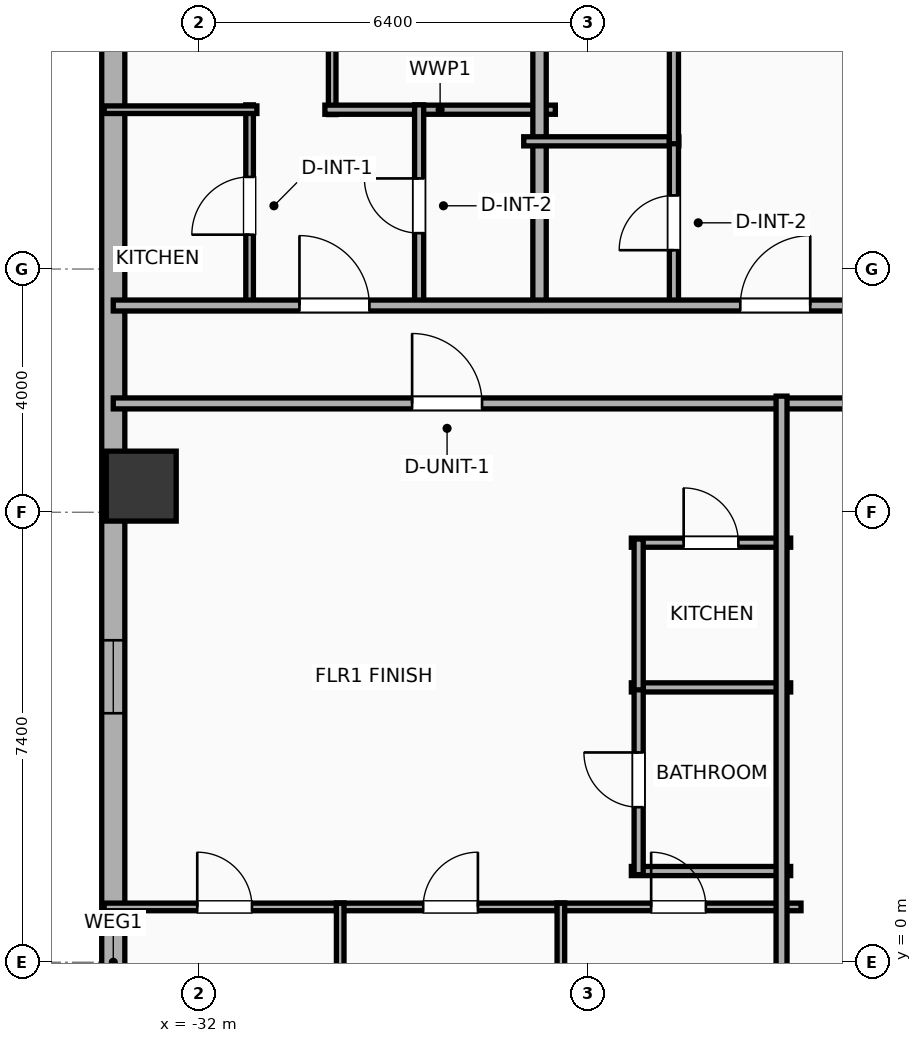
"""IFC4 building model, lengths in metres.
Left out: names, types, materials, properties, quantities, classifications, styles, units other than length and angle.
Written with IfcOpenShell. Run it as: python <this file> out.ifc"""

import sys

from ifc_helpers import new_model, si_unit, direction, frame, frame_2d, origin, origin_2d, place, context, subcontext, project, spatial, rectangle, hollow_rectangle, extrude, element, fill, save


model = new_model("IFC4")
c1 = context("Model", 3, precision=1e-05, world=origin(), true_north=direction((0.0, 1.0)))
c2 = subcontext(c1, "Body", "Model", "MODEL_VIEW")
j1 = project(units=[si_unit("LENGTHUNIT", "METRE"), si_unit("PLANEANGLEUNIT", "RADIAN")], contexts=[c1])
p1 = place(None, origin())
s1 = spatial("IfcSite", under=j1, at=p1, CompositionType="ELEMENT")
p2 = place(p1, origin())
s2 = spatial("IfcBuilding", under=s1, at=p2, CompositionType="ELEMENT")
p3 = place(p2, frame((0.0, 0.0, 29.9)))
s3 = spatial("IfcBuildingStorey", under=s2, at=p3, CompositionType="ELEMENT", Elevation=29.9)
p4 = place(p3, frame((-32.95, 7.83, 0.0), z_axis=(0.0, 0.0, 1.0), x_axis=(1.0, 0.0, 0.0)))
e1 = element("IfcColumn", 1, at=p4, inside=s3, PredefinedType="COLUMN", context=c2, shape_type="SweptSolid", body=[
    extrude(hollow_rectangle(XDim=1.15, YDim=1.15, WallThickness=0.04, at=origin_2d()), origin(), (0.0, 0.0, 1.0), 3.9),
])
p5 = place(p3, frame((-33.41, -18.381, 0.0), z_axis=(0.0, 0.0, 1.0), x_axis=(0.0, 1.0, 0.0)))
e2 = element("IfcWall", 2, at=p5, inside=s3, PredefinedType="ELEMENTEDWALL", context=c2, shape_type="SweptSolid", body=[
    extrude(rectangle(XDim=36.763, YDim=0.38, at=frame_2d((18.381, 0.0))), origin(), (0.0, 0.0, 1.0), 2.54),
])
p6 = place(p5, frame((33.537, 0.0, 0.75)))
e3 = element("IfcOpeningElement", 3, at=p6, cuts=e2, PredefinedType="OPENING", context=c2, shape_type="SweptSolid", body=[
    extrude(rectangle(XDim=1.2, YDim=1.63, at=frame_2d((0.6, 0.815))), frame((0.0, 0.2, 0.0), z_axis=(0.0, -1.0, 0.0), x_axis=(1.0, 0.0, 0.0)), (0.0, 0.0, 1.0), 0.4),
])
p7 = place(p5, frame((22.476, 0.0, 0.75)))
e4 = element("IfcOpeningElement", 4, at=p7, cuts=e2, PredefinedType="OPENING", context=c2, shape_type="SweptSolid", body=[
    extrude(rectangle(XDim=1.2, YDim=1.63, at=frame_2d((0.6, 0.815))), frame((0.0, 0.2, 0.0), z_axis=(0.0, -1.0, 0.0), x_axis=(1.0, 0.0, 0.0)), (0.0, 0.0, 1.0), 0.4),
])
p8 = place(p5, frame((13.226, 0.0, 0.75)))
e5 = element("IfcOpeningElement", 5, at=p8, cuts=e2, PredefinedType="OPENING", context=c2, shape_type="SweptSolid", body=[
    extrude(rectangle(XDim=1.2, YDim=1.63, at=frame_2d((0.6, 0.815))), frame((0.0, 0.2, 0.0), z_axis=(0.0, -1.0, 0.0), x_axis=(1.0, 0.0, 0.0)), (0.0, 0.0, 1.0), 0.4),
])
p9 = place(p3, frame((-33.41, 9.19, 0.0), z_axis=(0.0, 0.0, 1.0), x_axis=(1.0, 0.0, 0.0)))
e6 = element("IfcWall", 6, at=p9, inside=s3, PredefinedType="PARTITIONING", context=c2, shape_type="SweptSolid", body=[
    extrude(rectangle(XDim=23.53, YDim=0.18, at=frame_2d((11.765, 0.0))), origin(), (0.0, 0.0, 1.0), 3.65),
])
p10 = place(p9, frame((4.915, 0.0, 0.0)))
e7 = element("IfcOpeningElement", 7, at=p10, cuts=e6, PredefinedType="OPENING", context=c2, shape_type="SweptSolid", body=[
    extrude(rectangle(XDim=1.15, YDim=2.05, at=frame_2d((0.575, 1.025))), frame((0.0, 0.1, 0.0), z_axis=(0.0, -1.0, 0.0), x_axis=(1.0, 0.0, 0.0)), (0.0, 0.0, 1.0), 0.2),
])
p11 = place(p3, frame((-29.81, 13.94, 0.0), z_axis=(0.0, 0.0, 1.0), x_axis=(0.0, 1.0, 0.0)))
e8 = element("IfcWall", 8, at=p11, inside=s3, PredefinedType="PARTITIONING", context=c2, shape_type="SweptSolid", body=[
    extrude(rectangle(XDim=8.377, YDim=0.125, at=frame_2d((4.189, 0.0))), origin(), (0.0, 0.0, 1.0), 3.65),
])
p12 = place(p11, frame((1.561, 0.0, 0.0)))
e9 = element("IfcOpeningElement", 9, at=p12, cuts=e8, PredefinedType="OPENING", context=c2, shape_type="SweptSolid", body=[
    extrude(rectangle(XDim=0.9, YDim=2.05, at=frame_2d((0.45, 1.025))), frame((0.0, 0.073, 0.0), z_axis=(0.0, -1.0, 0.0), x_axis=(1.0, 0.0, 0.0)), (0.0, 0.0, 1.0), 0.145),
])
p13 = place(p3, frame((-29.93, 14.02, 0.0), z_axis=(0.0, 0.0, 1.0), x_axis=(1.0, 0.0, 0.0)))
e10 = element("IfcWall", 10, at=p13, inside=s3, PredefinedType="PLUMBINGWALL", context=c2, shape_type="SweptSolid", body=[
    extrude(rectangle(XDim=3.79, YDim=0.15, at=frame_2d((1.895, 0.0))), origin(), (0.0, 0.0, 1.0), 3.65),
])
p14 = place(p3, frame((-31.168, 10.78, 0.0), z_axis=(0.0, 0.0, 1.0), x_axis=(0.0, 1.0, 0.0)))
e11 = element("IfcWall", 11, at=p14, inside=s3, PredefinedType="PARTITIONING", context=c2, shape_type="SweptSolid", body=[
    extrude(rectangle(XDim=3.32, YDim=0.125, at=frame_2d((1.66, 0.0))), origin(), (0.0, 0.0, 1.0), 3.65),
])
p15 = place(p14, frame((1.185, 0.0, 0.0)))
e12 = element("IfcOpeningElement", 12, at=p15, cuts=e11, PredefinedType="OPENING", context=c2, shape_type="SweptSolid", body=[
    extrude(rectangle(XDim=0.95, YDim=2.05, at=frame_2d((0.475, 1.025))), frame((0.0, 0.073, 0.0), z_axis=(0.0, -1.0, 0.0), x_axis=(1.0, 0.0, 0.0)), (0.0, 0.0, 1.0), 0.145),
])
p16 = place(p3, frame((-33.56, 14.02, 0.0), z_axis=(0.0, 0.0, 1.0), x_axis=(1.0, 0.0, 0.0)))
e13 = element("IfcWall", 13, at=p16, inside=s3, PredefinedType="PARTITIONING", context=c2, shape_type="SweptSolid", body=[
    extrude(rectangle(XDim=2.512, YDim=0.125, at=frame_2d((1.256, 0.0))), origin(), (0.0, 0.0, 1.0), 3.65),
])
p17 = place(p3, frame((-28.38, 10.78, 0.0), z_axis=(0.0, 0.0, 1.0), x_axis=(0.0, 1.0, 0.0)))
e14 = element("IfcWall", 14, at=p17, inside=s3, PredefinedType="PLUMBINGWALL", context=c2, shape_type="SweptSolid", body=[
    extrude(rectangle(XDim=3.32, YDim=0.15, at=frame_2d((1.66, 0.0))), origin(), (0.0, 0.0, 1.0), 3.65),
])
p18 = place(p17, frame((1.21, 0.0, 0.0)))
e15 = element("IfcOpeningElement", 15, at=p18, cuts=e14, PredefinedType="OPENING", context=c2, shape_type="SweptSolid", body=[
    extrude(rectangle(XDim=0.9, YDim=2.05, at=frame_2d((0.45, 1.025))), frame((0.0, 0.085, 0.0), z_axis=(0.0, -1.0, 0.0), x_axis=(1.0, 0.0, 0.0)), (0.0, 0.0, 1.0), 0.17),
])
p19 = place(p3, frame((-26.4, 10.72, 0.0), z_axis=(0.0, 0.0, 1.0), x_axis=(0.0, 1.0, 0.0)))
e16 = element("IfcWall", 16, at=p19, inside=s3, PredefinedType="PARTITIONING", context=c2, shape_type="SweptSolid", body=[
    extrude(rectangle(XDim=11.49, YDim=0.22, at=frame_2d((5.745, 0.0))), origin(), (0.0, 0.0, 1.0), 3.65),
])
p20 = place(p3, frame((-26.66, 13.5, 0.0), z_axis=(0.0, 0.0, 1.0), x_axis=(1.0, 0.0, 0.0)))
e17 = element("IfcWall", 17, at=p20, inside=s3, PredefinedType="PLUMBINGWALL", context=c2, shape_type="SweptSolid", body=[
    extrude(rectangle(XDim=2.55, YDim=0.15, at=frame_2d((1.275, 0.0))), origin(), (0.0, 0.0, 1.0), 3.65),
])
p21 = place(p3, frame((-24.19, 10.78, 0.0), z_axis=(0.0, 0.0, 1.0), x_axis=(0.0, 1.0, 0.0)))
e18 = element("IfcWall", 18, at=p21, inside=s3, PredefinedType="PLUMBINGWALL", context=c2, shape_type="SweptSolid", body=[
    extrude(rectangle(XDim=2.76, YDim=0.15, at=frame_2d((1.38, 0.0))), origin(), (0.0, 0.0, 1.0), 3.65),
])
p22 = place(p21, frame((0.93, 0.0, 0.0)))
e19 = element("IfcOpeningElement", 19, at=p22, cuts=e18, PredefinedType="OPENING", context=c2, shape_type="SweptSolid", body=[
    extrude(rectangle(XDim=0.9, YDim=2.05, at=frame_2d((0.45, 1.025))), frame((0.0, 0.085, 0.0), z_axis=(0.0, -1.0, 0.0), x_axis=(1.0, 0.0, 0.0)), (0.0, 0.0, 1.0), 0.17),
])
p23 = place(p3, frame((-24.19, 13.46, 0.0), z_axis=(0.0, 0.0, 1.0), x_axis=(0.0, 1.0, 0.0)))
e20 = element("IfcWall", 20, at=p23, inside=s3, PredefinedType="PLUMBINGWALL", context=c2, shape_type="SweptSolid", body=[
    extrude(rectangle(XDim=8.798, YDim=0.15, at=frame_2d((4.399, 0.0))), origin(), (0.0, 0.0, 1.0), 3.65),
])
p24 = place(p23, frame((3.949, 0.0, 0.0)))
e21 = element("IfcOpeningElement", 21, at=p24, cuts=e20, PredefinedType="OPENING", context=c2, shape_type="SweptSolid", body=[
    extrude(rectangle(XDim=0.9, YDim=2.05, at=frame_2d((0.45, 1.025))), frame((0.0, 0.085, 0.0), z_axis=(0.0, -1.0, 0.0), x_axis=(1.0, 0.0, 0.0)), (0.0, 0.0, 1.0), 0.17),
])
p25 = place(p3, frame((-33.41, 10.8, 0.0), z_axis=(0.0, 0.0, 1.0), x_axis=(1.0, 0.0, 0.0)))
e22 = element("IfcWall", 22, at=p25, inside=s3, PredefinedType="PARTITIONING", context=c2, shape_type="SweptSolid", body=[
    extrude(rectangle(XDim=59.62, YDim=0.18, at=frame_2d((29.81, 0.0))), origin(), (0.0, 0.0, 1.0), 3.65),
])
p26 = place(p25, frame((3.062, 0.0, 0.0)))
e23 = element("IfcOpeningElement", 23, at=p26, cuts=e22, PredefinedType="OPENING", context=c2, shape_type="SweptSolid", body=[
    extrude(rectangle(XDim=1.15, YDim=2.05, at=frame_2d((0.575, 1.025))), frame((0.0, 0.1, 0.0), z_axis=(0.0, -1.0, 0.0), x_axis=(1.0, 0.0, 0.0)), (0.0, 0.0, 1.0), 0.2),
])
p27 = place(p25, frame((10.312, 0.0, 0.0)))
e24 = element("IfcOpeningElement", 24, at=p27, cuts=e22, PredefinedType="OPENING", context=c2, shape_type="SweptSolid", body=[
    extrude(rectangle(XDim=1.15, YDim=2.05, at=frame_2d((0.575, 1.025))), frame((0.0, 0.1, 0.0), z_axis=(0.0, -1.0, 0.0), x_axis=(1.0, 0.0, 0.0)), (0.0, 0.0, 1.0), 0.2),
])
p28 = place(p25, frame((15.153, 0.0, 0.0)))
e25 = element("IfcOpeningElement", 25, at=p28, cuts=e22, PredefinedType="OPENING", context=c2, shape_type="SweptSolid", body=[
    extrude(rectangle(XDim=0.9, YDim=2.05, at=frame_2d((0.45, 1.025))), frame((0.0, 0.1, 0.0), z_axis=(0.0, -1.0, 0.0), x_axis=(1.0, 0.0, 0.0)), (0.0, 0.0, 1.0), 0.2),
])
p29 = place(p25, frame((21.508, 0.0, 0.0)))
e26 = element("IfcOpeningElement", 26, at=p29, cuts=e22, PredefinedType="OPENING", context=c2, shape_type="SweptSolid", body=[
    extrude(rectangle(XDim=1.15, YDim=2.05, at=frame_2d((0.575, 1.025))), frame((0.0, 0.1, 0.0), z_axis=(0.0, -1.0, 0.0), x_axis=(1.0, 0.0, 0.0)), (0.0, 0.0, 1.0), 0.2),
])
p30 = place(p25, frame((26.355, 0.0, 0.0)))
e27 = element("IfcOpeningElement", 27, at=p30, cuts=e22, PredefinedType="OPENING", context=c2, shape_type="SweptSolid", body=[
    extrude(rectangle(XDim=0.9, YDim=2.05, at=frame_2d((0.45, 1.025))), frame((0.0, 0.1, 0.0), z_axis=(0.0, -1.0, 0.0), x_axis=(1.0, 0.0, 0.0)), (0.0, 0.0, 1.0), 0.2),
])
p31 = place(p25, frame((32.753, 0.0, 0.0)))
e28 = element("IfcOpeningElement", 28, at=p31, cuts=e22, PredefinedType="OPENING", context=c2, shape_type="SweptSolid", body=[
    extrude(rectangle(XDim=1.15, YDim=2.05, at=frame_2d((0.575, 1.025))), frame((0.0, 0.1, 0.0), z_axis=(0.0, -1.0, 0.0), x_axis=(1.0, 0.0, 0.0)), (0.0, 0.0, 1.0), 0.2),
])
p32 = place(p25, frame((36.163, 0.0, 0.0)))
e29 = element("IfcOpeningElement", 29, at=p32, cuts=e22, PredefinedType="OPENING", context=c2, shape_type="SweptSolid", body=[
    extrude(rectangle(XDim=1.15, YDim=2.05, at=frame_2d((0.575, 1.025))), frame((0.0, 0.1, 0.0), z_axis=(0.0, -1.0, 0.0), x_axis=(1.0, 0.0, 0.0)), (0.0, 0.0, 1.0), 0.2),
])
p33 = place(p25, frame((43.156, 0.0, 0.0)))
e30 = element("IfcOpeningElement", 30, at=p33, cuts=e22, PredefinedType="OPENING", context=c2, shape_type="SweptSolid", body=[
    extrude(rectangle(XDim=0.9, YDim=2.05, at=frame_2d((0.45, 1.025))), frame((0.0, 0.1, 0.0), z_axis=(0.0, -1.0, 0.0), x_axis=(1.0, 0.0, 0.0)), (0.0, 0.0, 1.0), 0.2),
])
p34 = place(p25, frame((47.36, 0.0, 0.0)))
e31 = element("IfcOpeningElement", 31, at=p34, cuts=e22, PredefinedType="OPENING", context=c2, shape_type="SweptSolid", body=[
    extrude(rectangle(XDim=1.15, YDim=2.05, at=frame_2d((0.575, 1.025))), frame((0.0, 0.1, 0.0), z_axis=(0.0, -1.0, 0.0), x_axis=(1.0, 0.0, 0.0)), (0.0, 0.0, 1.0), 0.2),
])
p35 = place(p25, frame((55.337, 0.0, 0.0)))
e32 = element("IfcOpeningElement", 32, at=p35, cuts=e22, PredefinedType="OPENING", context=c2, shape_type="SweptSolid", body=[
    extrude(rectangle(XDim=1.15, YDim=2.05, at=frame_2d((0.575, 1.025))), frame((0.0, 0.1, 0.0), z_axis=(0.0, -1.0, 0.0), x_axis=(1.0, 0.0, 0.0)), (0.0, 0.0, 1.0), 0.2),
])
p36 = place(p3, frame((-24.89, 6.9, 0.0), z_axis=(0.0, 0.0, 1.0), x_axis=(1.0, 0.0, 0.0)))
e33 = element("IfcWall", 33, at=p36, inside=s3, PredefinedType="PLUMBINGWALL", context=c2, shape_type="SweptSolid", body=[
    extrude(rectangle(XDim=2.62, YDim=0.15, at=frame_2d((1.31, 0.0))), origin(), (0.0, 0.0, 1.0), 2.54),
])
p37 = place(p36, frame((0.86, 0.0, 0.0)))
e34 = element("IfcOpeningElement", 34, at=p37, cuts=e33, PredefinedType="OPENING", context=c2, shape_type="SweptSolid", body=[
    extrude(rectangle(XDim=0.9, YDim=2.05, at=frame_2d((0.45, 1.025))), frame((0.0, 0.085, 0.0), z_axis=(0.0, -1.0, 0.0), x_axis=(1.0, 0.0, 0.0)), (0.0, 0.0, 1.0), 0.17),
])
for number, where, z_axis, x_axis in (
    (35, (-24.89, 4.52, 0.0), (0.0, 0.0, 1.0), (1.0, 0.0, 0.0)),
    (36, (-24.89, 1.5, 0.0), (0.0, 0.0, 1.0), (1.0, 0.0, 0.0)),
):
    element("IfcWall", number, at=place(p3, frame(where, z_axis=z_axis, x_axis=x_axis)), inside=s3, PredefinedType="PLUMBINGWALL", context=c2, shape_type="SweptSolid", body=[
        extrude(rectangle(XDim=2.62, YDim=0.15, at=frame_2d((1.31, 0.0))), origin(), (0.0, 0.0, 1.0), 3.65),
    ])
p38 = place(p3, frame((-24.77, 1.44, 0.0), z_axis=(0.0, 0.0, 1.0), x_axis=(0.0, 1.0, 0.0)))
e37 = element("IfcWall", 37, at=p38, inside=s3, PredefinedType="PLUMBINGWALL", context=c2, shape_type="SweptSolid", body=[
    extrude(rectangle(XDim=3.12, YDim=0.15, at=frame_2d((1.56, 0.0))), origin(), (0.0, 0.0, 1.0), 3.65),
])
p39 = place(p38, frame((1.11, 0.0, 0.0)))
e38 = element("IfcOpeningElement", 38, at=p39, cuts=e37, PredefinedType="OPENING", context=c2, shape_type="SweptSolid", body=[
    extrude(rectangle(XDim=0.9, YDim=2.05, at=frame_2d((0.45, 1.025))), frame((0.0, 0.085, 0.0), z_axis=(0.0, -1.0, 0.0), x_axis=(1.0, 0.0, 0.0)), (0.0, 0.0, 1.0), 0.17),
])
p40 = place(p3, frame((-24.77, 4.48, 0.0), z_axis=(0.0, 0.0, 1.0), x_axis=(0.0, 1.0, 0.0)))
e39 = element("IfcWall", 39, at=p40, inside=s3, PredefinedType="PLUMBINGWALL", context=c2, shape_type="SweptSolid", body=[
    extrude(rectangle(XDim=2.48, YDim=0.15, at=frame_2d((1.24, 0.0))), origin(), (0.0, 0.0, 1.0), 3.65),
])
p41 = place(p3, frame((-33.56, 0.91, 0.0), z_axis=(0.0, 0.0, 1.0), x_axis=(1.0, 0.0, 0.0)))
e40 = element("IfcWall", 40, at=p41, inside=s3, PredefinedType="PARTITIONING", context=c2, shape_type="SweptSolid", body=[
    extrude(rectangle(XDim=3.945, YDim=0.125, at=frame_2d((1.972, 0.0))), origin(), (0.0, 0.0, 1.0), 3.65),
])
p42 = place(p41, frame((1.531, 0.0, 0.0)))
e41 = element("IfcOpeningElement", 41, at=p42, cuts=e40, PredefinedType="OPENING", context=c2, shape_type="SweptSolid", body=[
    extrude(rectangle(XDim=0.9, YDim=2.05, at=frame_2d((0.45, 1.025))), frame((0.0, 0.073, 0.0), z_axis=(0.0, -1.0, 0.0), x_axis=(1.0, 0.0, 0.0)), (0.0, 0.0, 1.0), 0.145),
])
p43 = place(p3, frame((-29.74, 0.91, 0.0), z_axis=(0.0, 0.0, 1.0), x_axis=(1.0, 0.0, 0.0)))
e42 = element("IfcWall", 42, at=p43, inside=s3, PredefinedType="PARTITIONING", context=c2, shape_type="SweptSolid", body=[
    extrude(rectangle(XDim=3.754, YDim=0.125, at=frame_2d((1.877, 0.0))), origin(), (0.0, 0.0, 1.0), 3.65),
])
p44 = place(p43, frame((1.427, 0.0, 0.0)))
e43 = element("IfcOpeningElement", 43, at=p44, cuts=e42, PredefinedType="OPENING", context=c2, shape_type="SweptSolid", body=[
    extrude(rectangle(XDim=0.9, YDim=2.05, at=frame_2d((0.45, 1.025))), frame((0.0, 0.073, 0.0), z_axis=(0.0, -1.0, 0.0), x_axis=(1.0, 0.0, 0.0)), (0.0, 0.0, 1.0), 0.145),
])
p45 = place(p3, frame((-26.112, 0.91, 0.0), z_axis=(0.0, 0.0, 1.0), x_axis=(1.0, 0.0, 0.0)))
e44 = element("IfcWall", 44, at=p45, inside=s3, PredefinedType="PARTITIONING", context=c2, shape_type="SweptSolid", body=[
    extrude(rectangle(XDim=4.011, YDim=0.125, at=frame_2d((2.006, 0.0))), origin(), (0.0, 0.0, 1.0), 3.65),
])
p46 = place(p45, frame((1.547, 0.0, 0.0)))
e45 = element("IfcOpeningElement", 45, at=p46, cuts=e44, PredefinedType="OPENING", context=c2, shape_type="SweptSolid", body=[
    extrude(rectangle(XDim=0.9, YDim=2.05, at=frame_2d((0.45, 1.025))), frame((0.0, 0.073, 0.0), z_axis=(0.0, -1.0, 0.0), x_axis=(1.0, 0.0, 0.0)), (0.0, 0.0, 1.0), 0.145),
])
for number, where, z_axis, x_axis in (
    (46, (-26.049, -9.51, 0.0), (0.0, 0.0, 1.0), (0.0, 1.0, 0.0)),
    (47, (-29.678, -9.51, 0.0), (0.0, 0.0, 1.0), (0.0, 1.0, 0.0)),
):
    element("IfcWall", number, at=place(p3, frame(where, z_axis=z_axis, x_axis=x_axis)), inside=s3, PredefinedType="PARTITIONING", context=c2, shape_type="SweptSolid", body=[
        extrude(rectangle(XDim=10.48, YDim=0.125, at=frame_2d((5.24, 0.0))), origin(), (0.0, 0.0, 1.0), 3.65),
    ])
p47 = place(p3, frame((-22.42, -9.31, 0.0), z_axis=(0.0, 0.0, 1.0), x_axis=(0.0, 1.0, 0.0)))
e48 = element("IfcWall", 48, at=p47, inside=s3, PredefinedType="PARTITIONING", context=c2, shape_type="SweptSolid", body=[
    extrude(rectangle(XDim=18.62, YDim=0.18, at=frame_2d((9.31, 0.0))), origin(), (0.0, 0.0, 1.0), 3.65),
])
p48 = place(p7, origin())
e49 = element("IfcWindow", 49, at=p48, inside=s3, PartitioningType="SINGLE_PANEL", PredefinedType="WINDOW", context=c2, shape_type="SweptSolid", body=[
    extrude(rectangle(XDim=1.2, YDim=1.63, at=frame_2d((0.6, 0.815))), frame((0.0, 0.03, 0.0), z_axis=(0.0, -1.0, 0.0), x_axis=(1.0, 0.0, 0.0)), (0.0, 0.0, 1.0), 0.06),
])
fill(e4, e49)
p49 = place(p10, origin())
e50 = element("IfcDoor", 50, at=p49, inside=s3, OperationType="SINGLE_SWING_LEFT", PredefinedType="DOOR", context=c2, shape_type="SweptSolid", body=[
    extrude(rectangle(XDim=1.15, YDim=2.05, at=frame_2d((0.575, 1.025))), frame((0.0, 0.025, 0.0), z_axis=(0.0, -1.0, 0.0), x_axis=(1.0, 0.0, 0.0)), (0.0, 0.0, 1.0), 0.05),
])
fill(e7, e50)
p50 = place(p15, origin())
e51 = element("IfcDoor", 51, at=p50, inside=s3, OperationType="SINGLE_SWING_LEFT", PredefinedType="DOOR", context=c2, shape_type="SweptSolid", body=[
    extrude(rectangle(XDim=0.95, YDim=2.05, at=frame_2d((0.475, 1.025))), frame((0.0, 0.025, 0.0), z_axis=(0.0, -1.0, 0.0), x_axis=(1.0, 0.0, 0.0)), (0.0, 0.0, 1.0), 0.05),
])
fill(e12, e51)
p51 = place(p18, origin())
e52 = element("IfcDoor", 52, at=p51, inside=s3, OperationType="SINGLE_SWING_RIGHT", PredefinedType="DOOR", context=c2, shape_type="SweptSolid", body=[
    extrude(rectangle(XDim=0.9, YDim=2.05, at=frame_2d((0.45, 1.025))), frame((0.0, 0.025, 0.0), z_axis=(0.0, -1.0, 0.0), x_axis=(1.0, 0.0, 0.0)), (0.0, 0.0, 1.0), 0.05),
])
fill(e15, e52)
p52 = place(p22, origin())
e53 = element("IfcDoor", 53, at=p52, inside=s3, OperationType="SINGLE_SWING_LEFT", PredefinedType="DOOR", context=c2, shape_type="SweptSolid", body=[
    extrude(rectangle(XDim=0.9, YDim=2.05, at=frame_2d((0.45, 1.025))), frame((0.0, 0.025, 0.0), z_axis=(0.0, -1.0, 0.0), x_axis=(1.0, 0.0, 0.0)), (0.0, 0.0, 1.0), 0.05),
])
fill(e19, e53)
p53 = place(p26, origin())
e54 = element("IfcDoor", 54, at=p53, inside=s3, OperationType="SINGLE_SWING_LEFT", PredefinedType="DOOR", context=c2, shape_type="SweptSolid", body=[
    extrude(rectangle(XDim=1.15, YDim=2.05, at=frame_2d((0.575, 1.025))), frame((0.0, 0.025, 0.0), z_axis=(0.0, -1.0, 0.0), x_axis=(1.0, 0.0, 0.0)), (0.0, 0.0, 1.0), 0.05),
])
fill(e23, e54)
p54 = place(p27, origin())
e55 = element("IfcDoor", 55, at=p54, inside=s3, OperationType="SINGLE_SWING_RIGHT", PredefinedType="DOOR", context=c2, shape_type="SweptSolid", body=[
    extrude(rectangle(XDim=1.15, YDim=2.05, at=frame_2d((0.575, 1.025))), frame((0.0, 0.025, 0.0), z_axis=(0.0, -1.0, 0.0), x_axis=(1.0, 0.0, 0.0)), (0.0, 0.0, 1.0), 0.05),
])
fill(e24, e55)
p55 = place(p37, origin())
e56 = element("IfcDoor", 56, at=p55, inside=s3, OperationType="SINGLE_SWING_LEFT", PredefinedType="DOOR", context=c2, shape_type="SweptSolid", body=[
    extrude(rectangle(XDim=0.9, YDim=2.05, at=frame_2d((0.45, 1.025))), frame((0.0, 0.025, 0.0), z_axis=(0.0, -1.0, 0.0), x_axis=(1.0, 0.0, 0.0)), (0.0, 0.0, 1.0), 0.05),
])
fill(e34, e56)
p56 = place(p39, origin())
e57 = element("IfcDoor", 57, at=p56, inside=s3, OperationType="SINGLE_SWING_RIGHT", PredefinedType="DOOR", context=c2, shape_type="SweptSolid", body=[
    extrude(rectangle(XDim=0.9, YDim=2.05, at=frame_2d((0.45, 1.025))), frame((0.0, 0.025, 0.0), z_axis=(0.0, -1.0, 0.0), x_axis=(1.0, 0.0, 0.0)), (0.0, 0.0, 1.0), 0.05),
])
fill(e38, e57)
p57 = place(p42, origin())
e58 = element("IfcDoor", 58, at=p57, inside=s3, OperationType="SINGLE_SWING_LEFT", PredefinedType="DOOR", context=c2, shape_type="SweptSolid", body=[
    extrude(rectangle(XDim=0.9, YDim=2.05, at=frame_2d((0.45, 1.025))), frame((0.0, 0.025, 0.0), z_axis=(0.0, -1.0, 0.0), x_axis=(1.0, 0.0, 0.0)), (0.0, 0.0, 1.0), 0.05),
])
fill(e41, e58)
p58 = place(p44, origin())
e59 = element("IfcDoor", 59, at=p58, inside=s3, OperationType="SINGLE_SWING_RIGHT", PredefinedType="DOOR", context=c2, shape_type="SweptSolid", body=[
    extrude(rectangle(XDim=0.9, YDim=2.05, at=frame_2d((0.45, 1.025))), frame((0.0, 0.025, 0.0), z_axis=(0.0, -1.0, 0.0), x_axis=(1.0, 0.0, 0.0)), (0.0, 0.0, 1.0), 0.05),
])
fill(e43, e59)
p59 = place(p46, origin())
e60 = element("IfcDoor", 60, at=p59, inside=s3, OperationType="SINGLE_SWING_LEFT", PredefinedType="DOOR", context=c2, shape_type="SweptSolid", body=[
    extrude(rectangle(XDim=0.9, YDim=2.05, at=frame_2d((0.45, 1.025))), frame((0.0, 0.025, 0.0), z_axis=(0.0, -1.0, 0.0), x_axis=(1.0, 0.0, 0.0)), (0.0, 0.0, 1.0), 0.05),
])
fill(e45, e60)
save(model, sys.argv[1])
